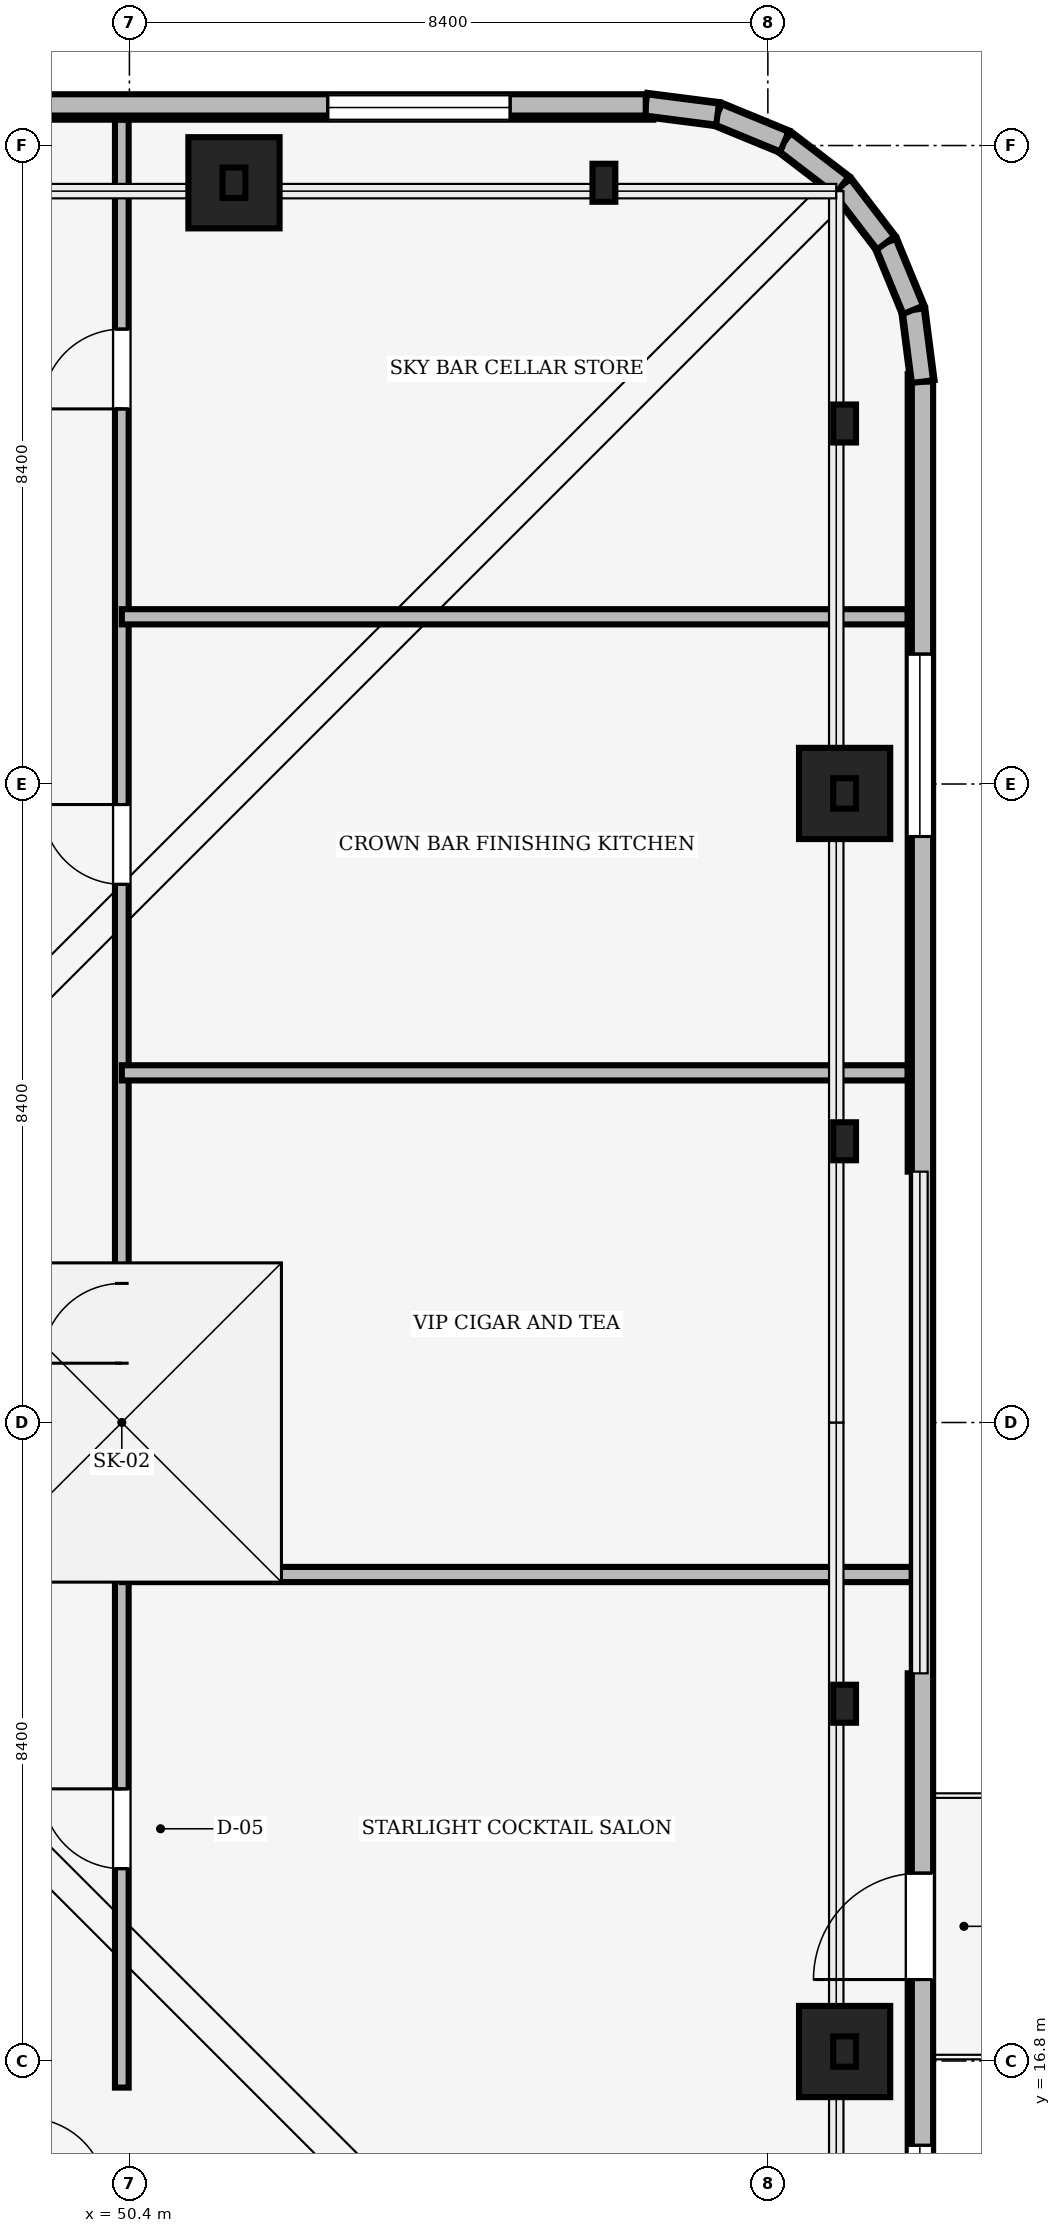
"""IFC4 building model, lengths in metres.
Left out: names, types, materials, properties, quantities, classifications, styles, units other than length and angle.
Written with IfcOpenShell. Run it as: python <this file> out.ifc"""

import sys

from ifc_helpers import new_model, si_unit, direction, frame, frame_2d, origin, origin_2d, place, context, subcontext, project, spatial, rectangle, i_section, extrude, source, transform, mapped, element, fill, save


model = new_model("IFC4")
c1 = context("Model", 3, precision=1e-05, world=origin(), true_north=direction((0.0, 1.0)))
c2 = subcontext(c1, "Body", "Model", "MODEL_VIEW")
j1 = project(units=[si_unit("LENGTHUNIT", "METRE"), si_unit("PLANEANGLEUNIT", "RADIAN")], contexts=[c1])
p1 = place(None, origin())
s1 = spatial("IfcSite", under=j1, at=p1, CompositionType="ELEMENT")
p2 = place(p1, origin())
s2 = spatial("IfcBuilding", under=s1, at=p2, CompositionType="ELEMENT")
p3 = place(p2, frame((0.0, 0.0, 301.15)))
s3 = spatial("IfcBuildingStorey", under=s2, at=p3, CompositionType="ELEMENT", Elevation=301.15)
m1 = source(origin(), c2, "Body", "SweptSolid", [
    extrude(rectangle(XDim=1.2, YDim=1.2, at=origin_2d()), origin(), (0.0, 0.0, 1.0), 4.6),
])
for number, where, z_axis, x_axis in (
    (1, (59.81, 16.924, 0.0), (0.0, 0.0, 1.0), (1.0, 0.0, 0.0)),
    (2, (59.81, 33.476, 0.0), (0.0, 0.0, 1.0), (1.0, 0.0, 0.0)),
    (3, (51.776, 41.51, 0.0), (0.0, 0.0, 1.0), (1.0, 0.0, 0.0)),
):
    element("IfcColumn", number, at=place(p3, frame(where, z_axis=z_axis, x_axis=x_axis)), inside=s3, PredefinedType="COLUMN", context=c2, shape_type="MappedRepresentation", body=[
        mapped(m1, transform((0.0, 0.0, 0.0), scale=1.0)),
    ])
m2 = source(origin(), c2, "Body", "SweptSolid", [
    extrude(i_section(OverallWidth=0.3, OverallDepth=0.5, WebThickness=0.014, FlangeThickness=0.028, FilletRadius=0.027, at=origin_2d()), origin(), (0.0, 0.0, 1.0), 4.6),
])
for number, where, z_axis, x_axis in (
    (4, (59.81, 21.5, 0.0), (0.0, 0.0, 1.0), (1.0, 0.0, 0.0)),
    (5, (59.81, 28.9, 0.0), (0.0, 0.0, 1.0), (1.0, 0.0, 0.0)),
    (6, (59.81, 38.343, 0.0), (0.0, 0.0, 1.0), (1.0, 0.0, 0.0)),
    (7, (56.643, 41.51, 0.0), (0.0, 0.0, 1.0), (1.0, 0.0, 0.0)),
):
    element("IfcColumn", number, at=place(p3, frame(where, z_axis=z_axis, x_axis=x_axis)), inside=s3, PredefinedType="COLUMN", context=c2, shape_type="MappedRepresentation", body=[
        mapped(m2, transform((0.0, 0.0, 0.0), scale=1.0)),
    ])
m3 = source(origin(), c2, "Body", "SweptSolid", [
    extrude(i_section(OverallWidth=0.3, OverallDepth=0.4, WebThickness=0.013, FlangeThickness=0.024, FilletRadius=0.027, at=origin_2d()), origin(), (0.0, 0.0, 1.0), 12.85),
])
for number, where, z_axis, x_axis in (
    (8, (59.81, 16.924, 5.0), (0.0, 0.0, 1.0), (1.0, 0.0, 0.0)),
    (9, (59.81, 33.476, 5.0), (0.0, 0.0, 1.0), (1.0, 0.0, 0.0)),
    (10, (51.776, 41.51, 5.0), (0.0, 0.0, 1.0), (1.0, 0.0, 0.0)),
):
    element("IfcColumn", number, at=place(p3, frame(where, z_axis=z_axis, x_axis=x_axis)), inside=s3, PredefinedType="COLUMN", context=c2, shape_type="MappedRepresentation", body=[
        mapped(m3, transform((0.0, 0.0, 0.0), scale=1.0)),
    ])
m4 = source(origin(), c2, "Body", "SweptSolid", [
    extrude(rectangle(XDim=10.493, YDim=0.32, at=frame_2d((5.247, 0.0))), origin(), (0.0, 0.0, 1.0), 4.6),
])
p4 = place(p3, frame((57.293, 42.5, 0.0), z_axis=(0.0, 0.0, 1.0), x_axis=(-1.0, 0.0, 0.0)))
e11 = element("IfcWall", 11, at=p4, inside=s3, PredefinedType="SOLIDWALL", context=c2, shape_type="MappedRepresentation", body=[
    mapped(m4, transform((0.0, 0.0, 0.0), scale=1.0)),
])
m5 = source(origin(), c2, "Body", "SweptSolid", [
    extrude(rectangle(XDim=2.4, YDim=3.2, at=frame_2d((1.2, 1.6))), frame((0.0, 0.17, 0.0), z_axis=(0.0, -1.0, 0.0), x_axis=(1.0, 0.0, 0.0)), (0.0, 0.0, 1.0), 0.34),
])
p5 = place(p4, frame((1.884, 0.0, 0.72)))
e12 = element("IfcOpeningElement", 12, at=p5, cuts=e11, PredefinedType="OPENING", context=c2, shape_type="MappedRepresentation", body=[
    mapped(m5, transform((0.0, 0.0, 0.0), scale=1.0)),
])
p6 = place(p3, frame((60.8, 11.407, 0.0), z_axis=(0.0, 0.0, 1.0), x_axis=(0.0, 1.0, 0.0)))
e13 = element("IfcWall", 13, at=p6, inside=s3, PredefinedType="SOLIDWALL", context=c2, shape_type="MappedRepresentation", body=[
    mapped(m4, transform((0.0, 0.0, 0.0), scale=1.0)),
])
m6 = source(origin(), c2, "Body", "SweptSolid", [
    extrude(rectangle(XDim=1.4, YDim=2.3, at=frame_2d((0.7, 1.15))), frame((0.0, 0.17, 0.0), z_axis=(0.0, -1.0, 0.0), x_axis=(1.0, 0.0, 0.0)), (0.0, 0.0, 1.0), 0.34),
])
p7 = place(p6, frame((6.465, 0.0, 0.0)))
e14 = element("IfcOpeningElement", 14, at=p7, cuts=e13, PredefinedType="OPENING", context=c2, shape_type="MappedRepresentation", body=[
    mapped(m6, transform((0.0, 0.0, 0.0), scale=1.0)),
])
p8 = place(p6, frame((1.884, 0.0, 0.72)))
e15 = element("IfcOpeningElement", 15, at=p8, cuts=e13, PredefinedType="OPENING", context=c2, shape_type="MappedRepresentation", body=[
    mapped(m5, transform((0.0, 0.0, 0.0), scale=1.0)),
])
p9 = place(p3, frame((60.8, 28.5, 0.0), z_axis=(0.0, 0.0, 1.0), x_axis=(0.0, 1.0, 0.0)))
e16 = element("IfcWall", 16, at=p9, inside=s3, PredefinedType="SOLIDWALL", context=c2, shape_type="MappedRepresentation", body=[
    mapped(m4, transform((0.0, 0.0, 0.0), scale=1.0)),
])
p10 = place(p9, frame((4.409, 0.0, 0.72)))
e17 = element("IfcOpeningElement", 17, at=p10, cuts=e16, PredefinedType="OPENING", context=c2, shape_type="MappedRepresentation", body=[
    mapped(m5, transform((0.0, 0.0, 0.0), scale=1.0)),
])
m7 = source(origin(), c2, "Body", "SweptSolid", [
    extrude(rectangle(XDim=0.952, YDim=0.32, at=frame_2d((0.476, 0.0))), origin(), (0.0, 0.0, 1.0), 4.6),
])
p11 = place(p3, frame((60.834, 38.894, 0.0), z_axis=(0.0, 0.0, 1.0), x_axis=(-0.127410057845, 0.991850128376, 0.0)))
e18 = element("IfcWall", 18, at=p11, inside=s3, PredefinedType="SOLIDWALL", context=c2, shape_type="MappedRepresentation", body=[
    mapped(m7, transform((0.0, 0.0, 0.0), scale=1.0)),
])
m8 = source(origin(), c2, "Body", "SweptSolid", [
    extrude(rectangle(XDim=0.951, YDim=0.32, at=frame_2d((0.476, 0.0))), origin(), (0.0, 0.0, 1.0), 4.6),
])
p12 = place(p3, frame((60.713, 39.838, 0.0), z_axis=(0.0, 0.0, 1.0), x_axis=(-0.380620714252, 0.924731243055, 0.0)))
e19 = element("IfcWall", 19, at=p12, inside=s3, PredefinedType="SOLIDWALL", context=c2, shape_type="MappedRepresentation", body=[
    mapped(m8, transform((0.0, 0.0, 0.0), scale=1.0)),
])
m9 = source(origin(), c2, "Body", "SweptSolid", [
    extrude(rectangle(XDim=0.951, YDim=0.32, at=frame_2d((0.476, 0.0))), origin(), (0.0, 0.0, 1.0), 4.6),
])
p13 = place(p3, frame((60.351, 40.718, 0.0), z_axis=(0.0, 0.0, 1.0), x_axis=(-0.608183591152, 0.793796396725, 0.0)))
e20 = element("IfcWall", 20, at=p13, inside=s3, PredefinedType="SOLIDWALL", context=c2, shape_type="MappedRepresentation", body=[
    mapped(m9, transform((0.0, 0.0, 0.0), scale=1.0)),
])
m10 = source(origin(), c2, "Body", "SweptSolid", [
    extrude(rectangle(XDim=0.951, YDim=0.32, at=frame_2d((0.475, 0.0))), origin(), (0.0, 0.0, 1.0), 4.6),
])
p14 = place(p3, frame((59.773, 41.473, 0.0), z_axis=(0.0, 0.0, 1.0), x_axis=(-0.793825387185, 0.608145751166, 0.0)))
e21 = element("IfcWall", 21, at=p14, inside=s3, PredefinedType="SOLIDWALL", context=c2, shape_type="MappedRepresentation", body=[
    mapped(m10, transform((0.0, 0.0, 0.0), scale=1.0)),
])
p15 = place(p3, frame((59.018, 42.051, 0.0), z_axis=(0.0, 0.0, 1.0), x_axis=(-0.924731243055, 0.380620714252, 0.0)))
e22 = element("IfcWall", 22, at=p15, inside=s3, PredefinedType="SOLIDWALL", context=c2, shape_type="MappedRepresentation", body=[
    mapped(m8, transform((0.0, 0.0, 0.0), scale=1.0)),
])
p16 = place(p3, frame((58.138, 42.413, 0.0), z_axis=(0.0, 0.0, 1.0), x_axis=(-0.991850128376, 0.127410057845, 0.0)))
e23 = element("IfcWall", 23, at=p16, inside=s3, PredefinedType="SOLIDWALL", context=c2, shape_type="MappedRepresentation", body=[
    mapped(m7, transform((0.0, 0.0, 0.0), scale=1.0)),
])
m11 = source(origin(), c2, "Body", "SweptSolid", [
    extrude(rectangle(XDim=27.388, YDim=0.28, at=frame_2d((13.694, 0.0))), origin(), (0.0, 0.0, 1.0), 1.15),
])
p17 = place(p3, frame((60.834, 11.506, 5.0), z_axis=(0.0, 0.0, 1.0), x_axis=(0.0, 1.0, 0.0)))
e24 = element("IfcWall", 24, at=p17, inside=s3, PredefinedType="SOLIDWALL", context=c2, shape_type="MappedRepresentation", body=[
    mapped(m11, transform((0.0, 0.0, 0.0), scale=1.0)),
])
m12 = source(origin(), c2, "Body", "SweptSolid", [
    extrude(rectangle(XDim=0.952, YDim=0.28, at=frame_2d((0.476, 0.0))), origin(), (0.0, 0.0, 1.0), 1.15),
])
p18 = place(p3, frame((60.834, 38.894, 5.0), z_axis=(0.0, 0.0, 1.0), x_axis=(-0.127410057845, 0.991850128376, 0.0)))
e25 = element("IfcWall", 25, at=p18, inside=s3, PredefinedType="SOLIDWALL", context=c2, shape_type="MappedRepresentation", body=[
    mapped(m12, transform((0.0, 0.0, 0.0), scale=1.0)),
])
m13 = source(origin(), c2, "Body", "SweptSolid", [
    extrude(rectangle(XDim=0.951, YDim=0.28, at=frame_2d((0.476, 0.0))), origin(), (0.0, 0.0, 1.0), 1.15),
])
p19 = place(p3, frame((60.713, 39.838, 5.0), z_axis=(0.0, 0.0, 1.0), x_axis=(-0.380620714252, 0.924731243055, 0.0)))
e26 = element("IfcWall", 26, at=p19, inside=s3, PredefinedType="SOLIDWALL", context=c2, shape_type="MappedRepresentation", body=[
    mapped(m13, transform((0.0, 0.0, 0.0), scale=1.0)),
])
m14 = source(origin(), c2, "Body", "SweptSolid", [
    extrude(rectangle(XDim=0.951, YDim=0.28, at=frame_2d((0.476, 0.0))), origin(), (0.0, 0.0, 1.0), 1.15),
])
p20 = place(p3, frame((60.351, 40.718, 5.0), z_axis=(0.0, 0.0, 1.0), x_axis=(-0.608183591152, 0.793796396725, 0.0)))
e27 = element("IfcWall", 27, at=p20, inside=s3, PredefinedType="SOLIDWALL", context=c2, shape_type="MappedRepresentation", body=[
    mapped(m14, transform((0.0, 0.0, 0.0), scale=1.0)),
])
m15 = source(origin(), c2, "Body", "SweptSolid", [
    extrude(rectangle(XDim=0.951, YDim=0.28, at=frame_2d((0.475, 0.0))), origin(), (0.0, 0.0, 1.0), 1.15),
])
p21 = place(p3, frame((59.773, 41.473, 5.0), z_axis=(0.0, 0.0, 1.0), x_axis=(-0.793825387185, 0.608145751166, 0.0)))
e28 = element("IfcWall", 28, at=p21, inside=s3, PredefinedType="SOLIDWALL", context=c2, shape_type="MappedRepresentation", body=[
    mapped(m15, transform((0.0, 0.0, 0.0), scale=1.0)),
])
p22 = place(p3, frame((59.018, 42.051, 5.0), z_axis=(0.0, 0.0, 1.0), x_axis=(-0.924731243055, 0.380620714252, 0.0)))
e29 = element("IfcWall", 29, at=p22, inside=s3, PredefinedType="SOLIDWALL", context=c2, shape_type="MappedRepresentation", body=[
    mapped(m13, transform((0.0, 0.0, 0.0), scale=1.0)),
])
p23 = place(p3, frame((58.138, 42.413, 5.0), z_axis=(0.0, 0.0, 1.0), x_axis=(-0.991850128376, 0.127410057845, 0.0)))
e30 = element("IfcWall", 30, at=p23, inside=s3, PredefinedType="SOLIDWALL", context=c2, shape_type="MappedRepresentation", body=[
    mapped(m12, transform((0.0, 0.0, 0.0), scale=1.0)),
])
p24 = place(p3, frame((57.194, 42.534, 5.0), z_axis=(0.0, 0.0, 1.0), x_axis=(-1.0, 0.0, 0.0)))
e31 = element("IfcWall", 31, at=p24, inside=s3, PredefinedType="SOLIDWALL", context=c2, shape_type="MappedRepresentation", body=[
    mapped(m11, transform((0.0, 0.0, 0.0), scale=1.0)),
])
m16 = source(origin(), c2, "Body", "SweptSolid", [
    extrude(rectangle(XDim=25.888, YDim=0.18, at=frame_2d((12.944, 0.0))), origin(), (0.0, 0.0, 1.0), 4.142),
])
p25 = place(p3, frame((50.3, 16.45, 0.0), z_axis=(0.0, 0.0, 1.0), x_axis=(0.0, 1.0, 0.0)))
e32 = element("IfcWall", 32, at=p25, inside=s3, PredefinedType="PARTITIONING", context=c2, shape_type="MappedRepresentation", body=[
    mapped(m16, transform((0.0, 0.0, 0.0), scale=1.0)),
])
m17 = source(origin(), c2, "Body", "SweptSolid", [
    extrude(rectangle(XDim=1.05, YDim=2.2, at=frame_2d((0.525, 1.1))), frame((0.0, 0.1, 0.0), z_axis=(0.0, -1.0, 0.0), x_axis=(1.0, 0.0, 0.0)), (0.0, 0.0, 1.0), 0.2),
])
p26 = place(p25, frame((2.88, 0.0, 0.0)))
e33 = element("IfcOpeningElement", 33, at=p26, cuts=e32, PredefinedType="OPENING", context=c2, shape_type="MappedRepresentation", body=[
    mapped(m17, transform((0.0, 0.0, 0.0), scale=1.0)),
])
p27 = place(p25, frame((9.53, 0.0, 0.0)))
e34 = element("IfcOpeningElement", 34, at=p27, cuts=e32, PredefinedType="OPENING", context=c2, shape_type="MappedRepresentation", body=[
    mapped(m17, transform((0.0, 0.0, 0.0), scale=1.0)),
])
p28 = place(p25, frame((15.83, 0.0, 0.0)))
e35 = element("IfcOpeningElement", 35, at=p28, cuts=e32, PredefinedType="OPENING", context=c2, shape_type="MappedRepresentation", body=[
    mapped(m17, transform((0.0, 0.0, 0.0), scale=1.0)),
])
p29 = place(p25, frame((22.085, 0.0, 0.0)))
e36 = element("IfcOpeningElement", 36, at=p29, cuts=e32, PredefinedType="OPENING", context=c2, shape_type="MappedRepresentation", body=[
    mapped(m17, transform((0.0, 0.0, 0.0), scale=1.0)),
])
m18 = source(origin(), c2, "Body", "SweptSolid", [
    extrude(rectangle(XDim=10.392, YDim=0.2, at=frame_2d((5.196, 0.0))), origin(), (0.0, 0.0, 1.0), 4.142),
])
p30 = place(p3, frame((50.3, 23.2, 0.0), z_axis=(0.0, 0.0, 1.0), x_axis=(1.0, 0.0, 0.0)))
e37 = element("IfcWall", 37, at=p30, inside=s3, PredefinedType="PARTITIONING", context=c2, shape_type="MappedRepresentation", body=[
    mapped(m18, transform((0.0, 0.0, 0.0), scale=1.0)),
])
m19 = source(origin(), c2, "Body", "SweptSolid", [
    extrude(rectangle(XDim=10.338, YDim=0.2, at=frame_2d((5.169, 0.0))), origin(), (0.0, 0.0, 1.0), 4.142),
])
for number, where, z_axis, x_axis in (
    (38, (50.3, 29.8, 0.0), (0.0, 0.0, 1.0), (1.0, 0.0, 0.0)),
    (39, (50.3, 35.8, 0.0), (0.0, 0.0, 1.0), (1.0, 0.0, 0.0)),
):
    element("IfcWall", number, at=place(p3, frame(where, z_axis=z_axis, x_axis=x_axis)), inside=s3, PredefinedType="PARTITIONING", context=c2, shape_type="MappedRepresentation", body=[
        mapped(m19, transform((0.0, 0.0, 0.0), scale=1.0)),
    ])
m20 = source(origin(), c2, "Body", "SweptSolid", [
    extrude(rectangle(XDim=2.4, YDim=3.2, at=frame_2d((1.2, 1.6))), frame((0.0, 0.03, 0.0), z_axis=(0.0, -1.0, 0.0), x_axis=(1.0, 0.0, 0.0)), (0.0, 0.0, 1.0), 0.06),
])
p31 = place(p5, origin())
e40 = element("IfcWindow", 40, at=p31, inside=s3, PartitioningType="SINGLE_PANEL", PredefinedType="WINDOW", context=c2, shape_type="MappedRepresentation", body=[
    mapped(m20, transform((0.0, 0.0, 0.0), scale=1.0)),
])
fill(e12, e40)
m21 = source(origin(), c2, "Body", "SweptSolid", [
    extrude(rectangle(XDim=1.4, YDim=2.3, at=frame_2d((0.7, 1.15))), frame((0.0, 0.025, 0.0), z_axis=(0.0, -1.0, 0.0), x_axis=(1.0, 0.0, 0.0)), (0.0, 0.0, 1.0), 0.05),
])
p32 = place(p7, frame((1.4, 0.0, 0.0), z_axis=(0.0, 0.0, 1.0), x_axis=(-1.0, 0.0, 0.0)))
e41 = element("IfcDoor", 41, at=p32, inside=s3, OperationType="DOUBLE_DOOR_SLIDING", PredefinedType="DOOR", context=c2, shape_type="MappedRepresentation", body=[
    mapped(m21, transform((0.0, 0.0, 0.0), scale=1.0)),
])
fill(e14, e41)
p33 = place(p8, origin())
e42 = element("IfcWindow", 42, at=p33, inside=s3, PartitioningType="SINGLE_PANEL", PredefinedType="WINDOW", context=c2, shape_type="MappedRepresentation", body=[
    mapped(m20, transform((0.0, 0.0, 0.0), scale=1.0)),
])
fill(e15, e42)
p34 = place(p10, origin())
e43 = element("IfcWindow", 43, at=p34, inside=s3, PartitioningType="SINGLE_PANEL", PredefinedType="WINDOW", context=c2, shape_type="MappedRepresentation", body=[
    mapped(m20, transform((0.0, 0.0, 0.0), scale=1.0)),
])
fill(e17, e43)
p35 = place(p3, frame((0.0, 0.0, 4.6)))
p36 = place(p35, frame((50.3, 25.2, 0.35)))
e44 = element("IfcWindow", 44, at=p36, inside=s3, PartitioningType="SINGLE_PANEL", PredefinedType="SKYLIGHT", context=c2, shape_type="SweptSolid", body=[
    extrude(rectangle(XDim=4.2, YDim=4.2, at=origin_2d()), origin(), (0.0, 0.0, 1.0), 0.05),
])
m22 = source(origin(), c2, "Body", "SweptSolid", [
    extrude(rectangle(XDim=1.05, YDim=2.2, at=frame_2d((0.525, 1.1))), frame((0.0, 0.025, 0.0), z_axis=(0.0, -1.0, 0.0), x_axis=(1.0, 0.0, 0.0)), (0.0, 0.0, 1.0), 0.05),
])
p37 = place(p26, origin())
e45 = element("IfcDoor", 45, at=p37, inside=s3, OperationType="SINGLE_SWING_RIGHT", PredefinedType="DOOR", context=c2, shape_type="MappedRepresentation", body=[
    mapped(m22, transform((0.0, 0.0, 0.0), scale=1.0)),
])
fill(e33, e45)
p38 = place(p27, origin())
e46 = element("IfcDoor", 46, at=p38, inside=s3, OperationType="SINGLE_SWING_LEFT", PredefinedType="DOOR", context=c2, shape_type="MappedRepresentation", body=[
    mapped(m22, transform((0.0, 0.0, 0.0), scale=1.0)),
])
fill(e34, e46)
p39 = place(p28, origin())
e47 = element("IfcDoor", 47, at=p39, inside=s3, OperationType="SINGLE_SWING_RIGHT", PredefinedType="DOOR", context=c2, shape_type="MappedRepresentation", body=[
    mapped(m22, transform((0.0, 0.0, 0.0), scale=1.0)),
])
fill(e35, e47)
p40 = place(p29, origin())
e48 = element("IfcDoor", 48, at=p40, inside=s3, OperationType="SINGLE_SWING_LEFT", PredefinedType="DOOR", context=c2, shape_type="MappedRepresentation", body=[
    mapped(m22, transform((0.0, 0.0, 0.0), scale=1.0)),
])
fill(e36, e48)
save(model, sys.argv[1])
